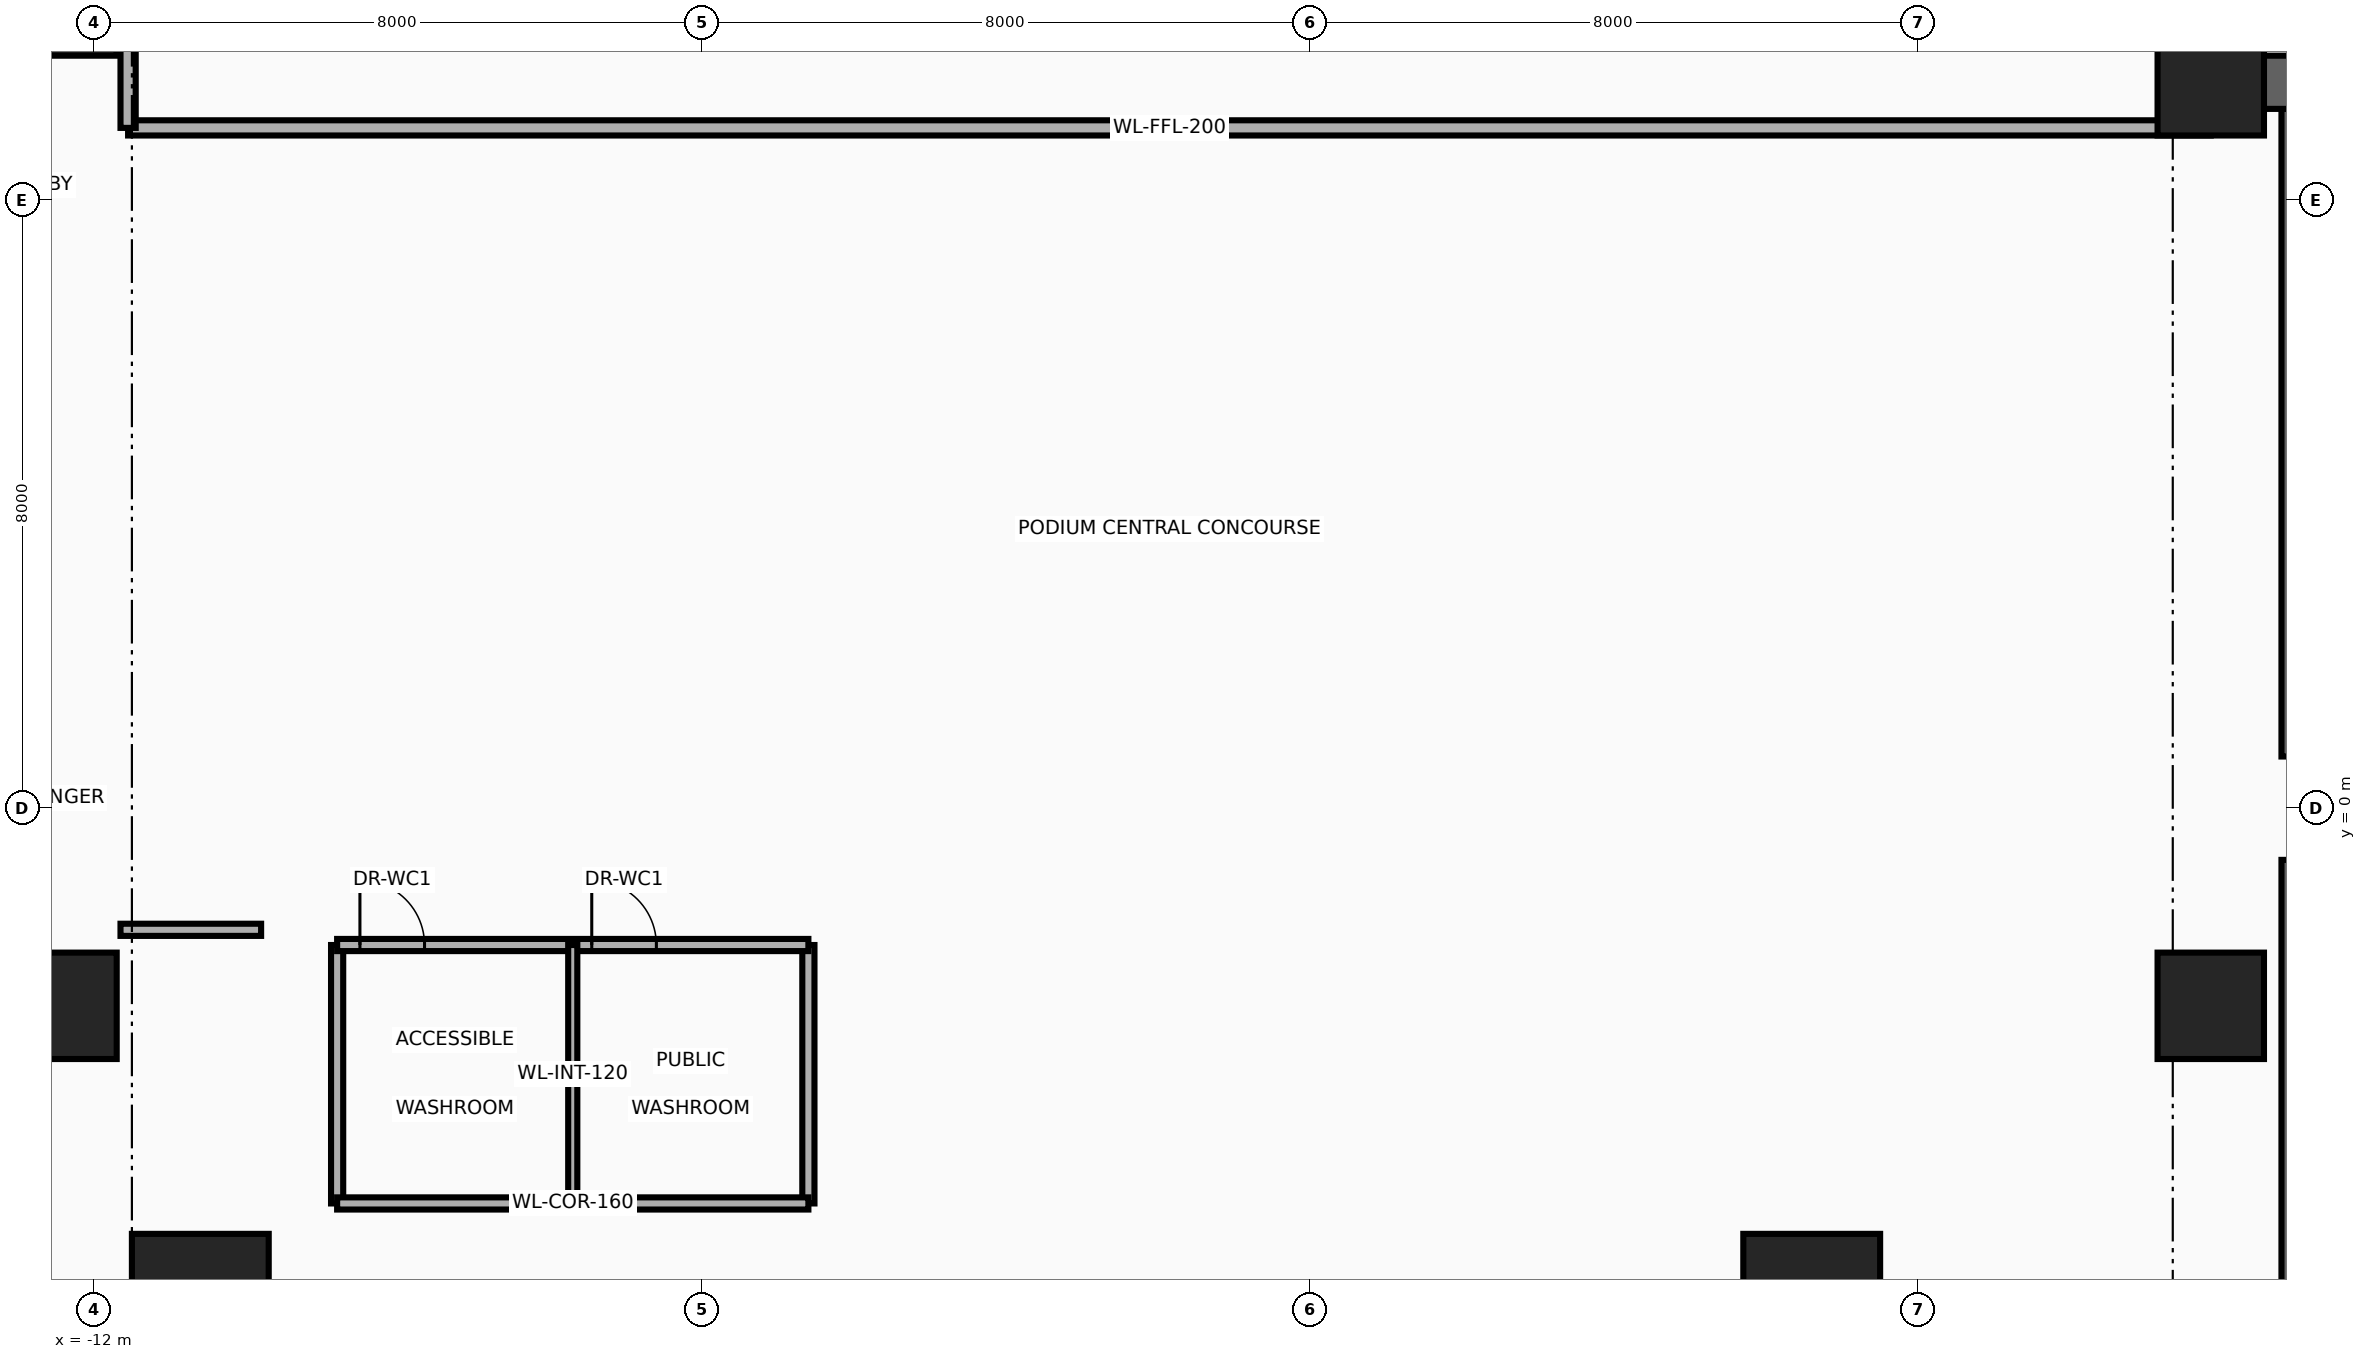
"""IFC4 building model, lengths in metres.
Left out: names, types, materials, properties, quantities, classifications, styles, units other than length and angle.
Written with IfcOpenShell. Run it as: python <this file> out.ifc"""

import sys

from ifc_helpers import new_model, si_unit, direction, frame, frame_2d, origin, origin_2d, place, context, subcontext, project, spatial, rectangle, extrude, source, transform, mapped, element, fill, save


model = new_model("IFC4")
c1 = context("Model", 3, precision=1e-05, world=origin(), true_north=direction((0.0, 1.0)))
c2 = subcontext(c1, "Body", "Model", "MODEL_VIEW")
j1 = project(units=[si_unit("LENGTHUNIT", "METRE"), si_unit("PLANEANGLEUNIT", "RADIAN")], contexts=[c1])
p1 = place(None, origin())
s1 = spatial("IfcSite", under=j1, at=p1, CompositionType="ELEMENT")
p2 = place(p1, origin())
s2 = spatial("IfcBuilding", under=s1, at=p2, CompositionType="ELEMENT")
p3 = place(p2, frame((0.0, 0.0, 20.8)))
s3 = spatial("IfcBuildingStorey", under=s2, at=p3, CompositionType="ELEMENT", Elevation=20.8)
for number, where, z_axis, x_axis in (
    (1, (16.89, 0.68, 0.0), (0.0, 0.0, 1.0), (0.0, 1.0, 0.0)),
    (2, (16.89, -9.2, 0.0), (0.0, 0.0, 1.0), (0.0, 1.0, 0.0)),
):
    element("IfcWall", number, at=place(p3, frame(where, z_axis=z_axis, x_axis=x_axis)), inside=s3, PredefinedType="SHEAR", context=c2, shape_type="SweptSolid", body=[
        extrude(rectangle(XDim=8.52, YDim=0.22, at=frame_2d((4.26, 0.0))), origin(), (0.0, 0.0, 1.0), 4.96),
    ])
p4 = place(p3, frame((15.85, 9.55, 0.0), z_axis=(0.0, 0.0, 1.0), x_axis=(1.0, 0.0, 0.0)))
e3 = element("IfcWall", 3, at=p4, inside=s3, PredefinedType="SHEAR", context=c2, shape_type="SweptSolid", body=[
    extrude(rectangle(XDim=9.0, YDim=0.7, at=frame_2d((4.5, 0.0))), origin(), (0.0, 0.0, 1.0), 4.96),
])
m1 = source(origin(), c2, "Body", "SweptSolid", [
    extrude(rectangle(XDim=1.4, YDim=1.4, at=origin_2d()), origin(), (0.0, 0.0, 1.0), 5.2),
])
for number, where, z_axis, x_axis in (
    (4, (-12.4, -2.6, 0.0), (0.0, 0.0, 1.0), (1.0, 0.0, 0.0)),
    (5, (-12.4, 10.6, 0.0), (0.0, 0.0, 1.0), (1.0, 0.0, 0.0)),
    (6, (15.85, -2.6, 0.0), (0.0, 0.0, 1.0), (1.0, 0.0, 0.0)),
    (7, (15.85, 9.55, 0.0), (0.0, 0.0, 1.0), (1.0, 0.0, 0.0)),
):
    element("IfcColumn", number, at=place(p3, frame(where, z_axis=z_axis, x_axis=x_axis)), inside=s3, PredefinedType="COLUMN", context=c2, shape_type="MappedRepresentation", body=[
        mapped(m1, transform((0.0, 0.0, 0.0), x_axis=(1.0, 0.0, 0.0), y_axis=(0.0, 1.0, 0.0), z_axis=(0.0, 0.0, 1.0), scale=1.0)),
    ])
m2 = source(origin(), c2, "Body", "SweptSolid", [
    extrude(rectangle(XDim=1.8, YDim=1.8, at=origin_2d()), origin(), (0.0, 0.0, 1.0), 5.2),
])
for number, where, z_axis, x_axis in (
    (8, (-10.6, -6.5, 0.0), (0.0, 0.0, 1.0), (1.0, 0.0, 0.0)),
    (9, (10.6, -6.5, 0.0), (0.0, 0.0, 1.0), (1.0, 0.0, 0.0)),
):
    element("IfcColumn", number, at=place(p3, frame(where, z_axis=z_axis, x_axis=x_axis)), inside=s3, PredefinedType="COLUMN", context=c2, shape_type="MappedRepresentation", body=[
        mapped(m2, transform((0.0, 0.0, 0.0), x_axis=(1.0, 0.0, 0.0), y_axis=(0.0, 1.0, 0.0), z_axis=(0.0, 0.0, 1.0), scale=1.0)),
    ])
for number, where, z_axis, x_axis in (
    (10, (-8.8, -5.2, 0.0), (0.0, 0.0, 1.0), (0.0, 1.0, 0.0)),
    (11, (-2.6, -5.2, 0.0), (0.0, 0.0, 1.0), (0.0, 1.0, 0.0)),
):
    element("IfcWall", number, at=place(p3, frame(where, z_axis=z_axis, x_axis=x_axis)), inside=s3, PredefinedType="PARTITIONING", context=c2, shape_type="SweptSolid", body=[
        extrude(rectangle(XDim=3.4, YDim=0.16, at=frame_2d((1.7, 0.0))), origin(), (0.0, 0.0, 1.0), 4.96),
    ])
p5 = place(p3, frame((-8.8, -5.2, 0.0), z_axis=(0.0, 0.0, 1.0), x_axis=(1.0, 0.0, 0.0)))
e12 = element("IfcWall", 12, at=p5, inside=s3, PredefinedType="PARTITIONING", context=c2, shape_type="SweptSolid", body=[
    extrude(rectangle(XDim=6.2, YDim=0.16, at=frame_2d((3.1, 0.0))), origin(), (0.0, 0.0, 1.0), 4.96),
])
p6 = place(p3, frame((-8.8, -1.8, 0.0), z_axis=(0.0, 0.0, 1.0), x_axis=(1.0, 0.0, 0.0)))
e13 = element("IfcWall", 13, at=p6, inside=s3, PredefinedType="PARTITIONING", context=c2, shape_type="SweptSolid", body=[
    extrude(rectangle(XDim=6.2, YDim=0.16, at=frame_2d((3.1, 0.0))), origin(), (0.0, 0.0, 1.0), 4.96),
])
p7 = place(p6, frame((0.3, 0.0, 0.0)))
e14 = element("IfcOpeningElement", 14, at=p7, cuts=e13, PredefinedType="OPENING", context=c2, shape_type="SweptSolid", body=[
    extrude(rectangle(XDim=0.85, YDim=2.1, at=frame_2d((0.425, 1.05))), frame((0.0, 0.095, 0.0), z_axis=(0.0, -1.0, 0.0), x_axis=(1.0, 0.0, 0.0)), (0.0, 0.0, 1.0), 0.19),
])
p8 = place(p6, frame((3.35, 0.0, 0.0)))
e15 = element("IfcOpeningElement", 15, at=p8, cuts=e13, PredefinedType="OPENING", context=c2, shape_type="SweptSolid", body=[
    extrude(rectangle(XDim=0.85, YDim=2.1, at=frame_2d((0.425, 1.05))), frame((0.0, 0.095, 0.0), z_axis=(0.0, -1.0, 0.0), x_axis=(1.0, 0.0, 0.0)), (0.0, 0.0, 1.0), 0.19),
])
p9 = place(p3, frame((-5.7, -5.2, 0.0), z_axis=(0.0, 0.0, 1.0), x_axis=(0.0, 1.0, 0.0)))
e16 = element("IfcWall", 16, at=p9, inside=s3, PredefinedType="PARTITIONING", context=c2, shape_type="SweptSolid", body=[
    extrude(rectangle(XDim=3.4, YDim=0.12, at=frame_2d((1.7, 0.0))), origin(), (0.0, 0.0, 1.0), 4.96),
])
p10 = place(p3, frame((-11.65, -1.6, 0.0), z_axis=(0.0, 0.0, 1.0), x_axis=(1.0, 0.0, 0.0)))
e17 = element("IfcWall", 17, at=p10, inside=s3, PredefinedType="PARTITIONING", context=c2, shape_type="SweptSolid", body=[
    extrude(rectangle(XDim=1.85, YDim=0.16, at=frame_2d((0.925, 0.0))), origin(), (0.0, 0.0, 1.0), 4.96),
])
p11 = place(p3, frame((-11.55, 8.95, 0.0), z_axis=(0.0, 0.0, 1.0), x_axis=(1.0, 0.0, 0.0)))
e18 = element("IfcWall", 18, at=p11, inside=s3, PredefinedType="PARTITIONING", context=c2, shape_type="SweptSolid", body=[
    extrude(rectangle(XDim=27.4, YDim=0.2, at=frame_2d((13.7, 0.0))), origin(), (0.0, 0.0, 1.0), 3.745),
])
for number, where, z_axis, x_axis in (
    (19, (-11.55, 8.95, 0.0), (0.0, 0.0, 1.0), (0.0, 1.0, 0.0)),
    (20, (15.85, 8.95, 0.0), (0.0, 0.0, 1.0), (0.0, 1.0, 0.0)),
):
    element("IfcWall", number, at=place(p3, frame(where, z_axis=z_axis, x_axis=x_axis)), inside=s3, PredefinedType="PARTITIONING", context=c2, shape_type="SweptSolid", body=[
        extrude(rectangle(XDim=6.7, YDim=0.2, at=frame_2d((3.35, 0.0))), origin(), (0.0, 0.0, 1.0), 3.745),
    ])
p12 = place(p7, origin())
e21 = element("IfcDoor", 21, at=p12, inside=s3, OperationType="SINGLE_SWING_LEFT", PredefinedType="DOOR", context=c2, shape_type="SweptSolid", body=[
    extrude(rectangle(XDim=0.85, YDim=2.1, at=frame_2d((0.425, 1.05))), frame((0.0, 0.025, 0.0), z_axis=(0.0, -1.0, 0.0), x_axis=(1.0, 0.0, 0.0)), (0.0, 0.0, 1.0), 0.05),
])
fill(e14, e21)
p13 = place(p8, origin())
e22 = element("IfcDoor", 22, at=p13, inside=s3, OperationType="SINGLE_SWING_RIGHT", PredefinedType="DOOR", context=c2, shape_type="SweptSolid", body=[
    extrude(rectangle(XDim=0.85, YDim=2.1, at=frame_2d((0.425, 1.05))), frame((0.0, 0.025, 0.0), z_axis=(0.0, -1.0, 0.0), x_axis=(1.0, 0.0, 0.0)), (0.0, 0.0, 1.0), 0.05),
])
fill(e15, e22)
save(model, sys.argv[1])
